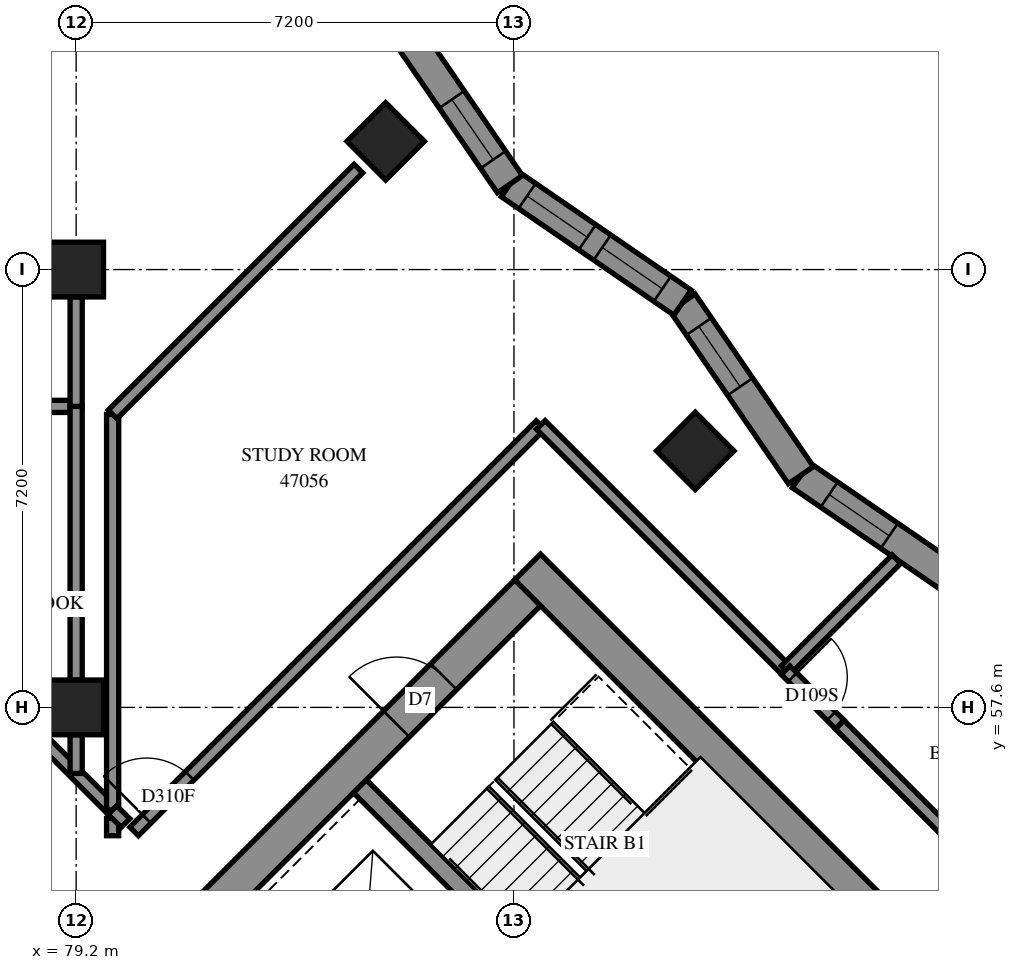
"""IFC4 building model, lengths in metres.
Left out: names, types, materials, properties, quantities, classifications, styles, units other than length and angle.
Written with IfcOpenShell. Run it as: python <this file> out.ifc"""

import sys

from ifc_helpers import new_model, si_unit, direction, frame, frame_2d, origin, origin_2d, place, context, subcontext, project, spatial, polyline, rectangle, outline, extrude, element, fill, save


model = new_model("IFC4")
c1 = context("Model", 3, precision=1e-05, world=origin(), true_north=direction((0.0, 1.0)))
c2 = subcontext(c1, "Body", "Model", "MODEL_VIEW")
j1 = project(units=[si_unit("LENGTHUNIT", "METRE"), si_unit("PLANEANGLEUNIT", "RADIAN")], contexts=[c1])
p1 = place(None, origin())
s1 = spatial("IfcSite", under=j1, at=p1, CompositionType="ELEMENT")
p2 = place(p1, origin())
s2 = spatial("IfcBuilding", under=s1, at=p2, CompositionType="ELEMENT")
p3 = place(p2, frame((0.0, 0.0, 172.8)))
s3 = spatial("IfcBuildingStorey", under=s2, at=p3, CompositionType="ELEMENT", Elevation=172.8)
for number, where, z_axis, x_axis in (
    (1, (79.2, 57.6, 0.0), (0.0, 0.0, 1.0), (1.0, 0.0, 0.0)),
    (2, (79.2, 64.8, 0.0), (0.0, 0.0, 1.0), (1.0, 0.0, 0.0)),
    (3, (84.291, 66.909, 0.0), (0.0, 0.0, 1.0), (0.707, -0.707, 0.0)),
    (4, (89.382, 61.818, 0.0), (0.0, 0.0, 1.0), (0.707, -0.707, 0.0)),
):
    element("IfcColumn", number, at=place(p3, frame(where, z_axis=z_axis, x_axis=x_axis)), inside=s3, PredefinedType="COLUMN", context=c2, shape_type="SweptSolid", body=[
        extrude(rectangle(XDim=0.9, YDim=0.9, at=origin_2d()), origin(), (0.0, 0.0, 1.0), 3.1),
    ])
p4 = place(p3, frame((86.625, 59.908, -0.3), z_axis=(0.0, 0.0, 1.0), x_axis=(0.7071067812, -0.7071067812, 0.0)))
e5 = element("IfcWall", 5, at=p4, inside=s3, PredefinedType="SHEAR", context=c2, shape_type="SweptSolid", body=[
    extrude(rectangle(XDim=15.6, YDim=0.6, at=frame_2d((7.8, 0.0))), origin(), (0.0, 0.0, 1.0), 2.7),
])
p5 = place(p4, frame((10.6, 0.0, 0.3)))
e6 = element("IfcOpeningElement", 6, at=p5, cuts=e5, PredefinedType="OPENING", context=c2, shape_type="SweptSolid", body=[
    extrude(rectangle(XDim=0.8, YDim=2.1, at=frame_2d((0.4, 1.05))), frame((0.0, 0.31, 0.0), z_axis=(0.0, -1.0, 0.0), x_axis=(1.0, 0.0, 0.0)), (0.0, 0.0, 1.0), 0.62),
])
p6 = place(p3, frame((76.442, 49.302, -0.3), z_axis=(0.0, 0.0, 1.0), x_axis=(0.7071067812, 0.7071067812, 0.0)))
e7 = element("IfcWall", 7, at=p6, inside=s3, PredefinedType="SHEAR", context=c2, shape_type="SweptSolid", body=[
    extrude(rectangle(XDim=14.4, YDim=0.6, at=frame_2d((7.2, 0.0))), origin(), (0.0, 0.0, 1.0), 2.7),
])
p7 = place(p6, frame((4.55, 0.0, 0.3)))
e8 = element("IfcOpeningElement", 8, at=p7, cuts=e7, PredefinedType="OPENING", context=c2, shape_type="SweptSolid", body=[
    extrude(rectangle(XDim=1.1, YDim=2.1, at=frame_2d((0.55, 1.05))), frame((0.0, 0.31, 0.0), z_axis=(0.0, -1.0, 0.0), x_axis=(1.0, 0.0, 0.0)), (0.0, 0.0, 1.0), 0.62),
])
p8 = place(p6, frame((11.35, 0.0, 0.3)))
e9 = element("IfcOpeningElement", 9, at=p8, cuts=e7, PredefinedType="OPENING", context=c2, shape_type="SweptSolid", body=[
    extrude(rectangle(XDim=1.1, YDim=2.1, at=frame_2d((0.55, 1.05))), frame((0.0, 0.31, 0.0), z_axis=(0.0, -1.0, 0.0), x_axis=(1.0, 0.0, 0.0)), (0.0, 0.0, 1.0), 0.62),
])
p9 = place(p3, frame((83.867, 56.302, 0.0), z_axis=(0.0, 0.0, 1.0), x_axis=(0.7071137256, -0.7070998367, 0.0)))
e10 = element("IfcWall", 10, at=p9, inside=s3, PredefinedType="SOLIDWALL", context=c2, shape_type="SweptSolid", body=[
    extrude(rectangle(XDim=7.2, YDim=0.3, at=frame_2d((3.6, 0.0))), origin(), (0.0, 0.0, 1.0), 3.1),
])
p10 = place(p3, frame((93.958, 59.471, 0.0), z_axis=(0.0, 0.0, 1.0), x_axis=(-0.8245662316, 0.5657654369, 0.0)))
e11 = element("IfcWall", 11, at=p10, inside=s3, PredefinedType="SOLIDWALL", context=c2, shape_type="SweptSolid", body=[
    extrude(outline(polyline([(-0.046, -0.25), (3.396, -0.25), (3.489, 0.25), (0.046, 0.25), (-0.046, -0.25)])), origin(), (0.0, 0.0, 1.0), 3.1),
])
p11 = place(p10, frame((1.68, 0.0, 0.45)))
e12 = element("IfcOpeningElement", 12, at=p11, cuts=e11, PredefinedType="OPENING", context=c2, shape_type="SweptSolid", body=[
    extrude(rectangle(XDim=1.2, YDim=2.5, at=frame_2d((0.6, 1.25))), frame((0.0, 0.26, 0.0), z_axis=(0.0, -1.0, 0.0), x_axis=(1.0, 0.0, 0.0)), (0.0, 0.0, 1.0), 0.52),
])
p12 = place(p3, frame((91.119, 61.418, 0.0), z_axis=(0.0, 0.0, 1.0), x_axis=(-0.5657456855, 0.8245797835, 0.0)))
e13 = element("IfcWall", 13, at=p12, inside=s3, PredefinedType="SOLIDWALL", context=c2, shape_type="SweptSolid", body=[
    extrude(outline(polyline([(0.046, -0.25), (3.489, -0.25), (3.396, 0.25), (-0.046, 0.25), (0.046, -0.25)])), origin(), (0.0, 0.0, 1.0), 3.1),
])
p13 = place(p12, frame((1.766, 0.0, 0.45)))
e14 = element("IfcOpeningElement", 14, at=p13, cuts=e13, PredefinedType="OPENING", context=c2, shape_type="SweptSolid", body=[
    extrude(rectangle(XDim=1.2, YDim=2.5, at=frame_2d((0.6, 1.25))), frame((0.0, 0.26, 0.0), z_axis=(0.0, -1.0, 0.0), x_axis=(1.0, 0.0, 0.0)), (0.0, 0.0, 1.0), 0.52),
])
p14 = place(p3, frame((89.172, 64.257, 0.0), z_axis=(0.0, 0.0, 1.0), x_axis=(-0.8245797835, 0.5657456855, 0.0)))
e15 = element("IfcWall", 15, at=p14, inside=s3, PredefinedType="SOLIDWALL", context=c2, shape_type="SweptSolid", body=[
    extrude(outline(polyline([(-0.046, -0.25), (3.396, -0.25), (3.489, 0.25), (0.046, 0.25), (-0.046, -0.25)])), origin(), (0.0, 0.0, 1.0), 3.1),
])
p15 = place(p14, frame((0.401, 0.0, 0.45)))
e16 = element("IfcOpeningElement", 16, at=p15, cuts=e15, PredefinedType="OPENING", context=c2, shape_type="SweptSolid", body=[
    extrude(rectangle(XDim=1.2, YDim=2.5, at=frame_2d((0.6, 1.25))), frame((0.0, 0.26, 0.0), z_axis=(0.0, -1.0, 0.0), x_axis=(1.0, 0.0, 0.0)), (0.0, 0.0, 1.0), 0.52),
])
p16 = place(p14, frame((1.899, 0.0, 0.45)))
e17 = element("IfcOpeningElement", 17, at=p16, cuts=e15, PredefinedType="OPENING", context=c2, shape_type="SweptSolid", body=[
    extrude(rectangle(XDim=1.2, YDim=2.5, at=frame_2d((0.6, 1.25))), frame((0.0, 0.26, 0.0), z_axis=(0.0, -1.0, 0.0), x_axis=(1.0, 0.0, 0.0)), (0.0, 0.0, 1.0), 0.52),
])
p17 = place(p3, frame((86.333, 66.204, 0.0), z_axis=(0.0, 0.0, 1.0), x_axis=(-0.5657654369, 0.8245662316, 0.0)))
e18 = element("IfcWall", 18, at=p17, inside=s3, PredefinedType="SOLIDWALL", context=c2, shape_type="SweptSolid", body=[
    extrude(outline(polyline([(0.046, -0.25), (3.489, -0.25), (3.396, 0.25), (-0.046, 0.25), (0.046, -0.25)])), origin(), (0.0, 0.0, 1.0), 3.1),
])
p18 = place(p17, frame((0.488, 0.0, 0.45)))
e19 = element("IfcOpeningElement", 19, at=p18, cuts=e18, PredefinedType="OPENING", context=c2, shape_type="SweptSolid", body=[
    extrude(rectangle(XDim=1.2, YDim=2.5, at=frame_2d((0.6, 1.25))), frame((0.0, 0.26, 0.0), z_axis=(0.0, -1.0, 0.0), x_axis=(1.0, 0.0, 0.0)), (0.0, 0.0, 1.0), 0.52),
])
p19 = place(p3, frame((91.755, 57.317, 0.0), z_axis=(0.0, 0.0, 1.0), x_axis=(0.7071067812, -0.7071067812, 0.0)))
e20 = element("IfcWall", 20, at=p19, inside=s3, PredefinedType="PARTITIONING", context=c2, shape_type="SweptSolid", body=[
    extrude(rectangle(XDim=11.639, YDim=0.2, at=frame_2d((5.819, 0.0))), origin(), (0.0, 0.0, 1.0), 3.1),
])
p20 = place(p3, frame((80.154, 55.56, 0.0), z_axis=(0.0, 0.0, 1.0), x_axis=(0.7071067812, 0.7071067812, 0.0)))
e21 = element("IfcWall", 21, at=p20, inside=s3, PredefinedType="PARTITIONING", context=c2, shape_type="SweptSolid", body=[
    extrude(rectangle(XDim=9.45, YDim=0.2, at=frame_2d((4.725, 0.0))), origin(), (0.0, 0.0, 1.0), 3.1),
])
p21 = place(p20, frame((0.292, 0.0, 0.0)))
e22 = element("IfcOpeningElement", 22, at=p21, cuts=e21, PredefinedType="OPENING", context=c2, shape_type="SweptSolid", body=[
    extrude(rectangle(XDim=1.0, YDim=2.1, at=frame_2d((0.5, 1.05))), frame((0.0, 0.11, 0.0), z_axis=(0.0, -1.0, 0.0), x_axis=(1.0, 0.0, 0.0)), (0.0, 0.0, 1.0), 0.22),
])
p22 = place(p3, frame((74.097, 61.611, 0.0), z_axis=(0.0, 0.0, 1.0), x_axis=(0.7071067812, -0.7071067812, 0.0)))
e23 = element("IfcWall", 23, at=p22, inside=s3, PredefinedType="PARTITIONING", context=c2, shape_type="SweptSolid", body=[
    extrude(rectangle(XDim=8.061, YDim=0.2, at=frame_2d((4.03, 0.0))), origin(), (0.0, 0.0, 1.0), 3.1),
])
p23 = place(p3, frame((79.8, 55.914, 0.0), z_axis=(0.0, 0.0, 1.0), x_axis=(0.0, 1.0, 0.0)))
e24 = element("IfcWall", 24, at=p23, inside=s3, PredefinedType="PARTITIONING", context=c2, shape_type="SweptSolid", body=[
    extrude(rectangle(XDim=6.504, YDim=0.2, at=frame_2d((3.252, 0.0))), origin(), (0.0, 0.0, 1.0), 3.1),
])
p24 = place(p3, frame((79.799, 62.419, 0.0), z_axis=(0.0, 0.0, 1.0), x_axis=(0.7071067812, 0.7071067812, 0.0)))
e25 = element("IfcWall", 25, at=p24, inside=s3, PredefinedType="PARTITIONING", context=c2, shape_type="SweptSolid", body=[
    extrude(rectangle(XDim=5.716, YDim=0.2, at=frame_2d((2.858, 0.0))), origin(), (0.0, 0.0, 1.0), 3.1),
])
p25 = place(p3, frame((86.841, 62.245, 0.0), z_axis=(0.0, 0.0, 1.0), x_axis=(0.7071067812, -0.7071067812, 0.0)))
e26 = element("IfcWall", 26, at=p25, inside=s3, PredefinedType="PARTITIONING", context=c2, shape_type="SweptSolid", body=[
    extrude(rectangle(XDim=5.699, YDim=0.2, at=frame_2d((2.85, 0.0))), origin(), (0.0, 0.0, 1.0), 3.1),
])
p26 = place(p3, frame((74.102, 62.55, 0.0), z_axis=(0.0, 0.0, 1.0), x_axis=(1.0, 0.0, 0.0)))
e27 = element("IfcWall", 27, at=p26, inside=s3, PredefinedType="PARTITIONING", context=c2, shape_type="SweptSolid", body=[
    extrude(rectangle(XDim=5.098, YDim=0.2, at=frame_2d((2.549, 0.0))), origin(), (0.0, 0.0, 1.0), 3.1),
])
p27 = place(p26, frame((1.319, 0.0, 0.0)))
e28 = element("IfcOpeningElement", 28, at=p27, cuts=e27, PredefinedType="OPENING", context=c2, shape_type="SweptSolid", body=[
    extrude(rectangle(XDim=1.0, YDim=2.1, at=frame_2d((0.5, 1.05))), frame((0.0, 0.11, 0.0), z_axis=(0.0, -1.0, 0.0), x_axis=(1.0, 0.0, 0.0)), (0.0, 0.0, 1.0), 0.22),
])
p28 = place(p3, frame((79.2, 58.05, 0.0), z_axis=(0.0, 0.0, 1.0), x_axis=(0.0, 1.0, 0.0)))
e29 = element("IfcWall", 29, at=p28, inside=s3, PredefinedType="PARTITIONING", context=c2, shape_type="SweptSolid", body=[
    extrude(rectangle(XDim=4.5, YDim=0.2, at=frame_2d((2.25, 0.0))), origin(), (0.0, 0.0, 1.0), 3.1),
])
p29 = place(p3, frame((90.867, 58.213, 0.0), z_axis=(0.0, 0.0, 1.0), x_axis=(0.7066219104, 0.7075913198, 0.0)))
e30 = element("IfcWall", 30, at=p29, inside=s3, PredefinedType="PARTITIONING", context=c2, shape_type="SweptSolid", body=[
    extrude(rectangle(XDim=2.579, YDim=0.2, at=frame_2d((1.289, 0.0))), origin(), (0.0, 0.0, 1.0), 3.1),
])
p30 = place(p3, frame((79.2, 62.55, 0.0), z_axis=(0.0, 0.0, 1.0), x_axis=(0.0, 1.0, 0.0)))
e31 = element("IfcWall", 31, at=p30, inside=s3, PredefinedType="PARTITIONING", context=c2, shape_type="SweptSolid", body=[
    extrude(rectangle(XDim=1.8, YDim=0.2, at=frame_2d((0.9, 0.0))), origin(), (0.0, 0.0, 1.0), 3.1),
])
p31 = place(p3, frame((90.867, 58.211, 0.0), z_axis=(0.0, 0.0, 1.0), x_axis=(0.706312726, -0.7078999456, 0.0)))
e32 = element("IfcWall", 32, at=p31, inside=s3, PredefinedType="PARTITIONING", context=c2, shape_type="SweptSolid", body=[
    extrude(rectangle(XDim=1.26, YDim=0.2, at=frame_2d((0.63, 0.0))), origin(), (0.0, 0.0, 1.0), 3.1),
])
p32 = place(p31, frame((0.162, 0.0, 0.0)))
e33 = element("IfcOpeningElement", 33, at=p32, cuts=e32, PredefinedType="OPENING", context=c2, shape_type="SweptSolid", body=[
    extrude(rectangle(XDim=0.9, YDim=2.1, at=frame_2d((0.45, 1.05))), frame((0.0, 0.11, 0.0), z_axis=(0.0, -1.0, 0.0), x_axis=(1.0, 0.0, 0.0)), (0.0, 0.0, 1.0), 0.22),
])
p33 = place(p3, frame((79.2, 56.514, 0.0), z_axis=(0.0, 0.0, 1.0), x_axis=(0.0, 1.0, 0.0)))
e34 = element("IfcWall", 34, at=p33, inside=s3, PredefinedType="PARTITIONING", context=c2, shape_type="SweptSolid", body=[
    extrude(rectangle(XDim=0.636, YDim=0.2, at=frame_2d((0.318, 0.0))), origin(), (0.0, 0.0, 1.0), 3.1),
])
p34 = place(p3, frame((79.8, 55.49, 0.0), z_axis=(0.0, 0.0, 1.0), x_axis=(0.0, 1.0, 0.0)))
e35 = element("IfcWall", 35, at=p34, inside=s3, PredefinedType="PARTITIONING", context=c2, shape_type="SweptSolid", body=[
    extrude(rectangle(XDim=0.284, YDim=0.2, at=frame_2d((0.142, 0.0))), origin(), (0.0, 0.0, 1.0), 3.1),
])
p35 = place(p3, frame((79.797, 55.911, 0.0), z_axis=(0.0, 0.0, 1.0), x_axis=(0.710418702, -0.7037792749, 0.0)))
e36 = element("IfcWall", 36, at=p35, inside=s3, PredefinedType="PARTITIONING", context=c2, shape_type="SweptSolid", body=[
    extrude(rectangle(XDim=0.301, YDim=0.2, at=frame_2d((0.151, 0.0))), origin(), (0.0, 0.0, 1.0), 3.1),
])
p36 = place(p11, origin())
e37 = element("IfcWindow", 37, at=p36, inside=s3, PartitioningType="SINGLE_PANEL", PredefinedType="WINDOW", context=c2, shape_type="SweptSolid", body=[
    extrude(rectangle(XDim=1.2, YDim=2.5, at=frame_2d((0.6, 1.25))), frame((0.0, 0.18, 0.0), z_axis=(0.0, -1.0, 0.0), x_axis=(1.0, 0.0, 0.0)), (0.0, 0.0, 1.0), 0.06),
])
fill(e12, e37)
p37 = place(p13, origin())
e38 = element("IfcWindow", 38, at=p37, inside=s3, PartitioningType="SINGLE_PANEL", PredefinedType="WINDOW", context=c2, shape_type="SweptSolid", body=[
    extrude(rectangle(XDim=1.2, YDim=2.5, at=frame_2d((0.6, 1.25))), frame((0.0, 0.18, 0.0), z_axis=(0.0, -1.0, 0.0), x_axis=(1.0, 0.0, 0.0)), (0.0, 0.0, 1.0), 0.06),
])
fill(e14, e38)
p38 = place(p15, origin())
e39 = element("IfcWindow", 39, at=p38, inside=s3, PartitioningType="SINGLE_PANEL", PredefinedType="WINDOW", context=c2, shape_type="SweptSolid", body=[
    extrude(rectangle(XDim=1.2, YDim=2.5, at=frame_2d((0.6, 1.25))), frame((0.0, 0.18, 0.0), z_axis=(0.0, -1.0, 0.0), x_axis=(1.0, 0.0, 0.0)), (0.0, 0.0, 1.0), 0.06),
])
fill(e16, e39)
p39 = place(p16, origin())
e40 = element("IfcWindow", 40, at=p39, inside=s3, PartitioningType="SINGLE_PANEL", PredefinedType="WINDOW", context=c2, shape_type="SweptSolid", body=[
    extrude(rectangle(XDim=1.2, YDim=2.5, at=frame_2d((0.6, 1.25))), frame((0.0, 0.18, 0.0), z_axis=(0.0, -1.0, 0.0), x_axis=(1.0, 0.0, 0.0)), (0.0, 0.0, 1.0), 0.06),
])
fill(e17, e40)
p40 = place(p18, origin())
e41 = element("IfcWindow", 41, at=p40, inside=s3, PartitioningType="SINGLE_PANEL", PredefinedType="WINDOW", context=c2, shape_type="SweptSolid", body=[
    extrude(rectangle(XDim=1.2, YDim=2.5, at=frame_2d((0.6, 1.25))), frame((0.0, 0.18, 0.0), z_axis=(0.0, -1.0, 0.0), x_axis=(1.0, 0.0, 0.0)), (0.0, 0.0, 1.0), 0.06),
])
fill(e19, e41)
p41 = place(p8, origin())
e42 = element("IfcDoor", 42, at=p41, inside=s3, OperationType="SINGLE_SWING_LEFT", PredefinedType="DOOR", context=c2, shape_type="SweptSolid", body=[
    extrude(rectangle(XDim=1.1, YDim=2.1, at=frame_2d((0.55, 1.05))), frame((0.0, 0.025, 0.0), z_axis=(0.0, -1.0, 0.0), x_axis=(1.0, 0.0, 0.0)), (0.0, 0.0, 1.0), 0.05),
])
fill(e9, e42)
p42 = place(p21, origin())
e43 = element("IfcDoor", 43, at=p42, inside=s3, OperationType="SINGLE_SWING_LEFT", PredefinedType="DOOR", context=c2, shape_type="SweptSolid", body=[
    extrude(rectangle(XDim=1.0, YDim=2.1, at=frame_2d((0.5, 1.05))), frame((0.0, 0.025, 0.0), z_axis=(0.0, -1.0, 0.0), x_axis=(1.0, 0.0, 0.0)), (0.0, 0.0, 1.0), 0.05),
])
fill(e22, e43)
p43 = place(p32, origin())
e44 = element("IfcDoor", 44, at=p43, inside=s3, OperationType="SINGLE_SWING_RIGHT", PredefinedType="DOOR", context=c2, shape_type="SweptSolid", body=[
    extrude(rectangle(XDim=0.9, YDim=2.1, at=frame_2d((0.45, 1.05))), frame((0.0, 0.025, 0.0), z_axis=(0.0, -1.0, 0.0), x_axis=(1.0, 0.0, 0.0)), (0.0, 0.0, 1.0), 0.05),
])
fill(e33, e44)
save(model, sys.argv[1])
